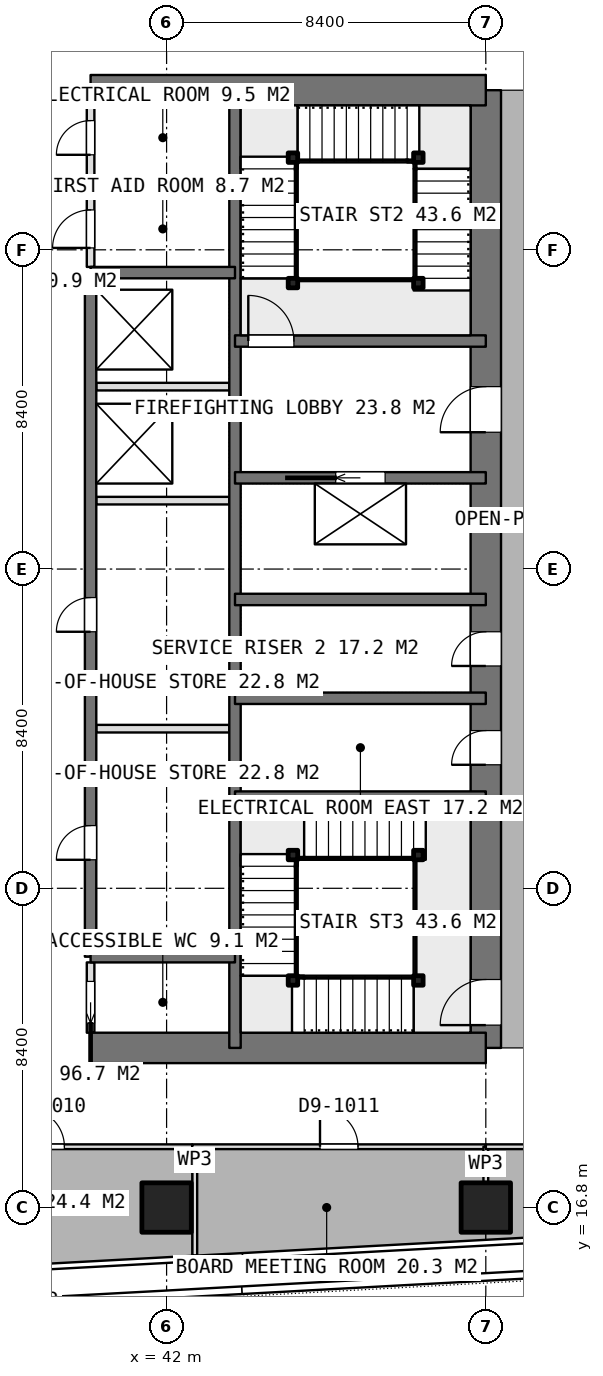
"""IFC4 building model, lengths in metres.
Left out: names, types, materials, properties, quantities, classifications, styles, units other than length and angle.
Written with IfcOpenShell. Run it as: python <this file> out.ifc"""

import sys

from ifc_helpers import new_model, si_unit, direction, frame, frame_2d, origin, origin_2d, place, context, subcontext, project, spatial, rectangle, extrude, element, fill, save


model = new_model("IFC4")
c1 = context("Model", 3, precision=1e-05, world=origin(), true_north=direction((0.0, 1.0)))
c2 = subcontext(c1, "Body", "Model", "MODEL_VIEW")
j1 = project(units=[si_unit("LENGTHUNIT", "METRE"), si_unit("PLANEANGLEUNIT", "RADIAN")], contexts=[c1])
p1 = place(None, origin())
s1 = spatial("IfcSite", under=j1, at=p1, CompositionType="ELEMENT")
p2 = place(p1, origin())
s2 = spatial("IfcBuilding", under=s1, at=p2, CompositionType="ELEMENT")
p3 = place(p2, frame((0.0, 0.0, 272.6)))
s3 = spatial("IfcBuildingStorey", under=s2, at=p3, CompositionType="ELEMENT", Elevation=272.6)
for number, where, z_axis, x_axis in (
    (1, (40.0, 21.0, 0.0), (0.0, 0.0, 1.0), (1.0, 0.0, 0.0)),
    (2, (40.0, 46.2, 0.0), (0.0, 0.0, 1.0), (1.0, 0.0, 0.0)),
):
    element("IfcWall", number, at=place(p3, frame(where, z_axis=z_axis, x_axis=x_axis)), inside=s3, PredefinedType="SHEAR", context=c2, shape_type="SweptSolid", body=[
        extrude(rectangle(XDim=10.4, YDim=0.8, at=frame_2d((5.2, 0.0))), origin(), (0.0, 0.0, 1.0), 3.75),
    ])
p4 = place(p3, frame((50.4, 21.0, 0.0), z_axis=(0.0, 0.0, 1.0), x_axis=(0.0, 1.0, 0.0)))
e3 = element("IfcWall", 3, at=p4, inside=s3, PredefinedType="SHEAR", context=c2, shape_type="SweptSolid", body=[
    extrude(rectangle(XDim=25.2, YDim=0.8, at=frame_2d((12.6, 0.0))), origin(), (0.0, 0.0, 1.0), 3.75),
])
p5 = place(p4, frame((16.2, 0.0, 0.0)))
e4 = element("IfcOpeningElement", 4, at=p5, cuts=e3, PredefinedType="OPENING", context=c2, shape_type="SweptSolid", body=[
    extrude(rectangle(XDim=1.2, YDim=2.1, at=frame_2d((0.6, 1.05))), frame((0.0, 0.41, 0.0), z_axis=(0.0, -1.0, 0.0), x_axis=(1.0, 0.0, 0.0)), (0.0, 0.0, 1.0), 0.82),
])
p6 = place(p4, frame((10.05, 0.0, 0.0)))
e5 = element("IfcOpeningElement", 5, at=p6, cuts=e3, PredefinedType="OPENING", context=c2, shape_type="SweptSolid", body=[
    extrude(rectangle(XDim=0.9, YDim=2.1, at=frame_2d((0.45, 1.05))), frame((0.0, 0.41, 0.0), z_axis=(0.0, -1.0, 0.0), x_axis=(1.0, 0.0, 0.0)), (0.0, 0.0, 1.0), 0.82),
])
p7 = place(p4, frame((7.45, 0.0, 0.0)))
e6 = element("IfcOpeningElement", 6, at=p7, cuts=e3, PredefinedType="OPENING", context=c2, shape_type="SweptSolid", body=[
    extrude(rectangle(XDim=0.9, YDim=2.1, at=frame_2d((0.45, 1.05))), frame((0.0, 0.41, 0.0), z_axis=(0.0, -1.0, 0.0), x_axis=(1.0, 0.0, 0.0)), (0.0, 0.0, 1.0), 0.82),
])
p8 = place(p4, frame((0.6, 0.0, 0.0)))
e7 = element("IfcOpeningElement", 7, at=p8, cuts=e3, PredefinedType="OPENING", context=c2, shape_type="SweptSolid", body=[
    extrude(rectangle(XDim=1.2, YDim=2.1, at=frame_2d((0.6, 1.05))), frame((0.0, 0.41, 0.0), z_axis=(0.0, -1.0, 0.0), x_axis=(1.0, 0.0, 0.0)), (0.0, 0.0, 1.0), 0.82),
])
p9 = place(p3, frame((43.8, 21.0, 0.0), z_axis=(0.0, 0.0, 1.0), x_axis=(0.0, 1.0, 0.0)))
e8 = element("IfcWall", 8, at=p9, inside=s3, PredefinedType="SHEAR", context=c2, shape_type="SweptSolid", body=[
    extrude(rectangle(XDim=25.2, YDim=0.3, at=frame_2d((12.6, 0.0))), origin(), (0.0, 0.0, 1.0), 3.75),
])
p10 = place(p3, frame((40.0, 23.4, 0.0), z_axis=(0.0, 0.0, 1.0), x_axis=(0.0, 1.0, 0.0)))
e9 = element("IfcWall", 9, at=p10, inside=s3, PredefinedType="SHEAR", context=c2, shape_type="SweptSolid", body=[
    extrude(rectangle(XDim=18.0, YDim=0.3, at=frame_2d((9.0, 0.0))), origin(), (0.0, 0.0, 1.0), 3.75),
])
p11 = place(p10, frame((2.55, 0.0, 0.0)))
e10 = element("IfcOpeningElement", 10, at=p11, cuts=e9, PredefinedType="OPENING", context=c2, shape_type="SweptSolid", body=[
    extrude(rectangle(XDim=0.9, YDim=2.1, at=frame_2d((0.45, 1.05))), frame((0.0, 0.16, 0.0), z_axis=(0.0, -1.0, 0.0), x_axis=(1.0, 0.0, 0.0)), (0.0, 0.0, 1.0), 0.32),
])
p12 = place(p10, frame((8.55, 0.0, 0.0)))
e11 = element("IfcOpeningElement", 11, at=p12, cuts=e9, PredefinedType="OPENING", context=c2, shape_type="SweptSolid", body=[
    extrude(rectangle(XDim=0.9, YDim=2.1, at=frame_2d((0.45, 1.05))), frame((0.0, 0.16, 0.0), z_axis=(0.0, -1.0, 0.0), x_axis=(1.0, 0.0, 0.0)), (0.0, 0.0, 1.0), 0.32),
])
for number, where, z_axis, x_axis in (
    (12, (40.0, 23.4, 0.0), (0.0, 0.0, 1.0), (1.0, 0.0, 0.0)),
    (13, (40.0, 41.4, 0.0), (0.0, 0.0, 1.0), (1.0, 0.0, 0.0)),
):
    element("IfcWall", number, at=place(p3, frame(where, z_axis=z_axis, x_axis=x_axis)), inside=s3, PredefinedType="SHEAR", context=c2, shape_type="SweptSolid", body=[
        extrude(rectangle(XDim=3.8, YDim=0.3, at=frame_2d((1.9, 0.0))), origin(), (0.0, 0.0, 1.0), 3.75),
    ])
for number, where, z_axis, x_axis in (
    (14, (43.8, 27.6, 0.0), (0.0, 0.0, 1.0), (1.0, 0.0, 0.0)),
    (15, (43.8, 30.2, 0.0), (0.0, 0.0, 1.0), (1.0, 0.0, 0.0)),
    (16, (43.8, 32.8, 0.0), (0.0, 0.0, 1.0), (1.0, 0.0, 0.0)),
):
    element("IfcWall", number, at=place(p3, frame(where, z_axis=z_axis, x_axis=x_axis)), inside=s3, PredefinedType="SHEAR", context=c2, shape_type="SweptSolid", body=[
        extrude(rectangle(XDim=6.6, YDim=0.3, at=frame_2d((3.3, 0.0))), origin(), (0.0, 0.0, 1.0), 3.75),
    ])
p13 = place(p3, frame((43.8, 36.0, 0.0), z_axis=(0.0, 0.0, 1.0), x_axis=(1.0, 0.0, 0.0)))
e17 = element("IfcWall", 17, at=p13, inside=s3, PredefinedType="SHEAR", context=c2, shape_type="SweptSolid", body=[
    extrude(rectangle(XDim=6.6, YDim=0.3, at=frame_2d((3.3, 0.0))), origin(), (0.0, 0.0, 1.0), 3.75),
])
p14 = place(p13, frame((2.65, 0.0, 0.0)))
e18 = element("IfcOpeningElement", 18, at=p14, cuts=e17, PredefinedType="OPENING", context=c2, shape_type="SweptSolid", body=[
    extrude(rectangle(XDim=1.3, YDim=2.1, at=frame_2d((0.65, 1.05))), frame((0.0, 0.16, 0.0), z_axis=(0.0, -1.0, 0.0), x_axis=(1.0, 0.0, 0.0)), (0.0, 0.0, 1.0), 0.32),
])
p15 = place(p3, frame((43.8, 39.6, 0.0), z_axis=(0.0, 0.0, 1.0), x_axis=(1.0, 0.0, 0.0)))
e19 = element("IfcWall", 19, at=p15, inside=s3, PredefinedType="SHEAR", context=c2, shape_type="SweptSolid", body=[
    extrude(rectangle(XDim=6.6, YDim=0.3, at=frame_2d((3.3, 0.0))), origin(), (0.0, 0.0, 1.0), 3.75),
])
p16 = place(p15, frame((0.35, 0.0, 0.0)))
e20 = element("IfcOpeningElement", 20, at=p16, cuts=e19, PredefinedType="OPENING", context=c2, shape_type="SweptSolid", body=[
    extrude(rectangle(XDim=1.2, YDim=2.1, at=frame_2d((0.6, 1.05))), frame((0.0, 0.16, 0.0), z_axis=(0.0, -1.0, 0.0), x_axis=(1.0, 0.0, 0.0)), (0.0, 0.0, 1.0), 0.32),
])
for number, where, z_axis, x_axis in (
    (21, (42.0, 16.8, 0.0), (0.0, 0.0, 1.0), (1.0, 0.0, 0.0)),
    (22, (50.4, 16.8, 0.0), (0.0, 0.0, 1.0), (1.0, 0.0, 0.0)),
):
    element("IfcColumn", number, at=place(p3, frame(where, z_axis=z_axis, x_axis=x_axis)), inside=s3, PredefinedType="COLUMN", context=c2, shape_type="SweptSolid", body=[
        extrude(rectangle(XDim=1.3, YDim=1.3, at=origin_2d()), origin(), (0.0, 0.0, 1.0), 3.75),
    ])
for number, where, z_axis, x_axis in (
    (23, (40.15, 29.4, 0.0), (0.0, 0.0, 1.0), (1.0, 0.0, 0.0)),
    (24, (40.15, 35.4, 0.0), (0.0, 0.0, 1.0), (1.0, 0.0, 0.0)),
    (25, (40.15, 38.4, 0.0), (0.0, 0.0, 1.0), (1.0, 0.0, 0.0)),
):
    element("IfcWall", number, at=place(p3, frame(where, z_axis=z_axis, x_axis=x_axis)), inside=s3, PredefinedType="PARTITIONING", context=c2, shape_type="SweptSolid", body=[
        extrude(rectangle(XDim=3.5, YDim=0.2, at=frame_2d((1.75, 0.0))), origin(), (0.0, 0.0, 1.0), 3.5),
    ])
p17 = place(p3, frame((40.0, 21.4, 0.0), z_axis=(0.0, 0.0, 1.0), x_axis=(0.0, 1.0, 0.0)))
e26 = element("IfcWall", 26, at=p17, inside=s3, PredefinedType="PARTITIONING", context=c2, shape_type="SweptSolid", body=[
    extrude(rectangle(XDim=1.85, YDim=0.2, at=frame_2d((0.925, 0.0))), origin(), (0.0, 0.0, 1.0), 3.5),
])
p18 = place(p17, frame((0.25, 0.0, 0.0)))
e27 = element("IfcOpeningElement", 27, at=p18, cuts=e26, PredefinedType="OPENING", context=c2, shape_type="SweptSolid", body=[
    extrude(rectangle(XDim=1.1, YDim=2.1, at=frame_2d((0.55, 1.05))), frame((0.0, 0.11, 0.0), z_axis=(0.0, -1.0, 0.0), x_axis=(1.0, 0.0, 0.0)), (0.0, 0.0, 1.0), 0.22),
])
p19 = place(p3, frame((40.0, 41.55, 0.0), z_axis=(0.0, 0.0, 1.0), x_axis=(0.0, 1.0, 0.0)))
e28 = element("IfcWall", 28, at=p19, inside=s3, PredefinedType="PARTITIONING", context=c2, shape_type="SweptSolid", body=[
    extrude(rectangle(XDim=4.25, YDim=0.2, at=frame_2d((2.125, 0.0))), origin(), (0.0, 0.0, 1.0), 3.5),
])
p20 = place(p19, frame((2.95, 0.0, 0.0)))
e29 = element("IfcOpeningElement", 29, at=p20, cuts=e28, PredefinedType="OPENING", context=c2, shape_type="SweptSolid", body=[
    extrude(rectangle(XDim=0.9, YDim=2.1, at=frame_2d((0.45, 1.05))), frame((0.0, 0.11, 0.0), z_axis=(0.0, -1.0, 0.0), x_axis=(1.0, 0.0, 0.0)), (0.0, 0.0, 1.0), 0.22),
])
p21 = place(p19, frame((0.5, 0.0, 0.0)))
e30 = element("IfcOpeningElement", 30, at=p21, cuts=e28, PredefinedType="OPENING", context=c2, shape_type="SweptSolid", body=[
    extrude(rectangle(XDim=1.0, YDim=2.1, at=frame_2d((0.5, 1.05))), frame((0.0, 0.11, 0.0), z_axis=(0.0, -1.0, 0.0), x_axis=(1.0, 0.0, 0.0)), (0.0, 0.0, 1.0), 0.22),
])
p22 = place(p3, frame((40.0, 43.7, 0.0), z_axis=(0.0, 0.0, 1.0), x_axis=(1.0, 0.0, 0.0)))
e31 = element("IfcWall", 31, at=p22, inside=s3, PredefinedType="PARTITIONING", context=c2, shape_type="SweptSolid", body=[
    extrude(rectangle(XDim=3.65, YDim=0.2, at=frame_2d((1.825, 0.0))), origin(), (0.0, 0.0, 1.0), 3.5),
])
p23 = place(p3, frame((34.948, 18.4, 0.0), z_axis=(0.0, 0.0, 1.0), x_axis=(1.0, 0.0, 0.0)))
e32 = element("IfcWall", 32, at=p23, inside=s3, PredefinedType="PARTITIONING", context=c2, shape_type="SweptSolid", body=[
    extrude(rectangle(XDim=7.725, YDim=0.125, at=frame_2d((3.863, 0.0))), origin(), (0.0, 0.0, 1.0), 3.5),
])
p24 = place(p23, frame((3.363, 0.0, 0.0)))
e33 = element("IfcOpeningElement", 33, at=p24, cuts=e32, PredefinedType="OPENING", context=c2, shape_type="SweptSolid", body=[
    extrude(rectangle(XDim=1.0, YDim=2.1, at=frame_2d((0.5, 1.05))), frame((0.0, 0.073, 0.0), z_axis=(0.0, -1.0, 0.0), x_axis=(1.0, 0.0, 0.0)), (0.0, 0.0, 1.0), 0.145),
])
p25 = place(p3, frame((42.742, 18.337, 0.0), z_axis=(0.0, 0.0, 1.0), x_axis=(0.0, -1.0, 0.0)))
e34 = element("IfcWall", 34, at=p25, inside=s3, PredefinedType="PARTITIONING", context=c2, shape_type="SweptSolid", body=[
    extrude(rectangle(XDim=2.799, YDim=0.125, at=frame_2d((1.399, 0.0))), origin(), (0.0, 0.0, 1.0), 3.5),
])
p26 = place(p3, frame((42.674, 18.4, 0.0), z_axis=(0.0, 0.0, 1.0), x_axis=(1.0, 0.0, 0.0)))
e35 = element("IfcWall", 35, at=p26, inside=s3, PredefinedType="PARTITIONING", context=c2, shape_type="SweptSolid", body=[
    extrude(rectangle(XDim=7.726, YDim=0.125, at=frame_2d((3.863, 0.0))), origin(), (0.0, 0.0, 1.0), 3.5),
])
p27 = place(p26, frame((3.363, 0.0, 0.0)))
e36 = element("IfcOpeningElement", 36, at=p27, cuts=e35, PredefinedType="OPENING", context=c2, shape_type="SweptSolid", body=[
    extrude(rectangle(XDim=1.0, YDim=2.1, at=frame_2d((0.5, 1.05))), frame((0.0, 0.073, 0.0), z_axis=(0.0, -1.0, 0.0), x_axis=(1.0, 0.0, 0.0)), (0.0, 0.0, 1.0), 0.145),
])
p28 = place(p3, frame((50.4, 18.4, 0.0), z_axis=(0.0, 0.0, 1.0), x_axis=(0.0, -1.0, 0.0)))
e37 = element("IfcWall", 37, at=p28, inside=s3, PredefinedType="PARTITIONING", context=c2, shape_type="SweptSolid", body=[
    extrude(rectangle(XDim=0.93, YDim=0.125, at=frame_2d((0.465, 0.0))), origin(), (0.0, 0.0, 1.0), 3.5),
])
p29 = place(p3, frame((50.401, 18.4, 0.0), z_axis=(0.0, 0.0, 1.0), x_axis=(1.0, 0.0, 0.0)))
e38 = element("IfcWall", 38, at=p29, inside=s3, PredefinedType="PARTITIONING", context=c2, shape_type="SweptSolid", body=[
    extrude(rectangle(XDim=5.999, YDim=0.125, at=frame_2d((3.0, 0.0))), origin(), (0.0, 0.0, 1.0), 3.5),
])
p30 = place(p29, frame((2.499, 0.0, 0.0)))
e39 = element("IfcOpeningElement", 39, at=p30, cuts=e38, PredefinedType="OPENING", context=c2, shape_type="SweptSolid", body=[
    extrude(rectangle(XDim=1.0, YDim=2.1, at=frame_2d((0.5, 1.05))), frame((0.0, 0.073, 0.0), z_axis=(0.0, -1.0, 0.0), x_axis=(1.0, 0.0, 0.0)), (0.0, 0.0, 1.0), 0.145),
])
for number, where, z_axis, x_axis in (
    (40, (45.325, 41.125, 0.0), (0.0, 0.0, 1.0), (1.0, 0.0, 0.0)),
    (41, (45.325, 44.425, 0.0), (0.0, 0.0, 1.0), (1.0, 0.0, 0.0)),
    (42, (48.625, 44.425, 0.0), (0.0, 0.0, 1.0), (1.0, 0.0, 0.0)),
    (43, (48.625, 41.125, 0.0), (0.0, 0.0, 1.0), (1.0, 0.0, 0.0)),
    (44, (48.625, 22.775, 0.0), (0.0, 0.0, 1.0), (1.0, 0.0, 0.0)),
    (45, (45.325, 22.775, 0.0), (0.0, 0.0, 1.0), (1.0, 0.0, 0.0)),
    (46, (45.325, 26.075, 0.0), (0.0, 0.0, 1.0), (1.0, 0.0, 0.0)),
    (47, (48.625, 26.075, 0.0), (0.0, 0.0, 1.0), (1.0, 0.0, 0.0)),
):
    element("IfcColumn", number, at=place(p3, frame(where, z_axis=z_axis, x_axis=x_axis)), inside=s3, PredefinedType="COLUMN", context=c2, shape_type="SweptSolid", body=[
        extrude(rectangle(XDim=0.25, YDim=0.25, at=origin_2d()), origin(), (0.0, 0.0, 1.0), 3.75),
    ])
p31 = place(p5, origin())
e48 = element("IfcDoor", 48, at=p31, inside=s3, OperationType="SINGLE_SWING_LEFT", PredefinedType="DOOR", context=c2, shape_type="SweptSolid", body=[
    extrude(rectangle(XDim=1.2, YDim=2.1, at=frame_2d((0.6, 1.05))), frame((0.0, 0.025, 0.0), z_axis=(0.0, -1.0, 0.0), x_axis=(1.0, 0.0, 0.0)), (0.0, 0.0, 1.0), 0.05),
])
fill(e4, e48)
p32 = place(p6, origin())
e49 = element("IfcDoor", 49, at=p32, inside=s3, OperationType="SINGLE_SWING_LEFT", PredefinedType="DOOR", context=c2, shape_type="SweptSolid", body=[
    extrude(rectangle(XDim=0.9, YDim=2.1, at=frame_2d((0.45, 1.05))), frame((0.0, 0.025, 0.0), z_axis=(0.0, -1.0, 0.0), x_axis=(1.0, 0.0, 0.0)), (0.0, 0.0, 1.0), 0.05),
])
fill(e5, e49)
p33 = place(p7, origin())
e50 = element("IfcDoor", 50, at=p33, inside=s3, OperationType="SINGLE_SWING_LEFT", PredefinedType="DOOR", context=c2, shape_type="SweptSolid", body=[
    extrude(rectangle(XDim=0.9, YDim=2.1, at=frame_2d((0.45, 1.05))), frame((0.0, 0.025, 0.0), z_axis=(0.0, -1.0, 0.0), x_axis=(1.0, 0.0, 0.0)), (0.0, 0.0, 1.0), 0.05),
])
fill(e6, e50)
p34 = place(p18, origin())
e51 = element("IfcDoor", 51, at=p34, inside=s3, OperationType="SLIDING_TO_LEFT", PredefinedType="DOOR", context=c2, shape_type="SweptSolid", body=[
    extrude(rectangle(XDim=1.1, YDim=2.1, at=frame_2d((0.55, 1.05))), frame((0.0, 0.025, 0.0), z_axis=(0.0, -1.0, 0.0), x_axis=(1.0, 0.0, 0.0)), (0.0, 0.0, 1.0), 0.05),
])
fill(e27, e51)
p35 = place(p20, origin())
e52 = element("IfcDoor", 52, at=p35, inside=s3, OperationType="SINGLE_SWING_LEFT", PredefinedType="DOOR", context=c2, shape_type="SweptSolid", body=[
    extrude(rectangle(XDim=0.9, YDim=2.1, at=frame_2d((0.45, 1.05))), frame((0.0, 0.025, 0.0), z_axis=(0.0, -1.0, 0.0), x_axis=(1.0, 0.0, 0.0)), (0.0, 0.0, 1.0), 0.05),
])
fill(e29, e52)
p36 = place(p21, origin())
e53 = element("IfcDoor", 53, at=p36, inside=s3, OperationType="SINGLE_SWING_LEFT", PredefinedType="DOOR", context=c2, shape_type="SweptSolid", body=[
    extrude(rectangle(XDim=1.0, YDim=2.1, at=frame_2d((0.5, 1.05))), frame((0.0, 0.025, 0.0), z_axis=(0.0, -1.0, 0.0), x_axis=(1.0, 0.0, 0.0)), (0.0, 0.0, 1.0), 0.05),
])
fill(e30, e53)
p37 = place(p11, origin())
e54 = element("IfcDoor", 54, at=p37, inside=s3, OperationType="SINGLE_SWING_LEFT", PredefinedType="DOOR", context=c2, shape_type="SweptSolid", body=[
    extrude(rectangle(XDim=0.9, YDim=2.1, at=frame_2d((0.45, 1.05))), frame((0.0, 0.025, 0.0), z_axis=(0.0, -1.0, 0.0), x_axis=(1.0, 0.0, 0.0)), (0.0, 0.0, 1.0), 0.05),
])
fill(e10, e54)
p38 = place(p12, origin())
e55 = element("IfcDoor", 55, at=p38, inside=s3, OperationType="SINGLE_SWING_LEFT", PredefinedType="DOOR", context=c2, shape_type="SweptSolid", body=[
    extrude(rectangle(XDim=0.9, YDim=2.1, at=frame_2d((0.45, 1.05))), frame((0.0, 0.025, 0.0), z_axis=(0.0, -1.0, 0.0), x_axis=(1.0, 0.0, 0.0)), (0.0, 0.0, 1.0), 0.05),
])
fill(e11, e55)
p39 = place(p14, origin())
e56 = element("IfcDoor", 56, at=p39, inside=s3, OperationType="SLIDING_TO_LEFT", PredefinedType="USERDEFINED", context=c2, shape_type="SweptSolid", body=[
    extrude(rectangle(XDim=1.3, YDim=2.1, at=frame_2d((0.65, 1.05))), frame((0.0, 0.025, 0.0), z_axis=(0.0, -1.0, 0.0), x_axis=(1.0, 0.0, 0.0)), (0.0, 0.0, 1.0), 0.05),
])
fill(e18, e56)
p40 = place(p24, origin())
e57 = element("IfcDoor", 57, at=p40, inside=s3, OperationType="SINGLE_SWING_LEFT", PredefinedType="DOOR", context=c2, shape_type="SweptSolid", body=[
    extrude(rectangle(XDim=1.0, YDim=2.1, at=frame_2d((0.5, 1.05))), frame((0.0, 0.025, 0.0), z_axis=(0.0, -1.0, 0.0), x_axis=(1.0, 0.0, 0.0)), (0.0, 0.0, 1.0), 0.05),
])
fill(e33, e57)
p41 = place(p27, origin())
e58 = element("IfcDoor", 58, at=p41, inside=s3, OperationType="SINGLE_SWING_LEFT", PredefinedType="DOOR", context=c2, shape_type="SweptSolid", body=[
    extrude(rectangle(XDim=1.0, YDim=2.1, at=frame_2d((0.5, 1.05))), frame((0.0, 0.025, 0.0), z_axis=(0.0, -1.0, 0.0), x_axis=(1.0, 0.0, 0.0)), (0.0, 0.0, 1.0), 0.05),
])
fill(e36, e58)
p42 = place(p16, origin())
e59 = element("IfcDoor", 59, at=p42, inside=s3, OperationType="SINGLE_SWING_RIGHT", PredefinedType="DOOR", context=c2, shape_type="SweptSolid", body=[
    extrude(rectangle(XDim=1.2, YDim=2.1, at=frame_2d((0.6, 1.05))), frame((0.0, 0.025, 0.0), z_axis=(0.0, -1.0, 0.0), x_axis=(1.0, 0.0, 0.0)), (0.0, 0.0, 1.0), 0.05),
])
fill(e20, e59)
p43 = place(p8, origin())
e60 = element("IfcDoor", 60, at=p43, inside=s3, OperationType="SINGLE_SWING_RIGHT", PredefinedType="DOOR", context=c2, shape_type="SweptSolid", body=[
    extrude(rectangle(XDim=1.2, YDim=2.1, at=frame_2d((0.6, 1.05))), frame((0.0, 0.025, 0.0), z_axis=(0.0, -1.0, 0.0), x_axis=(1.0, 0.0, 0.0)), (0.0, 0.0, 1.0), 0.05),
])
fill(e7, e60)
save(model, sys.argv[1])
